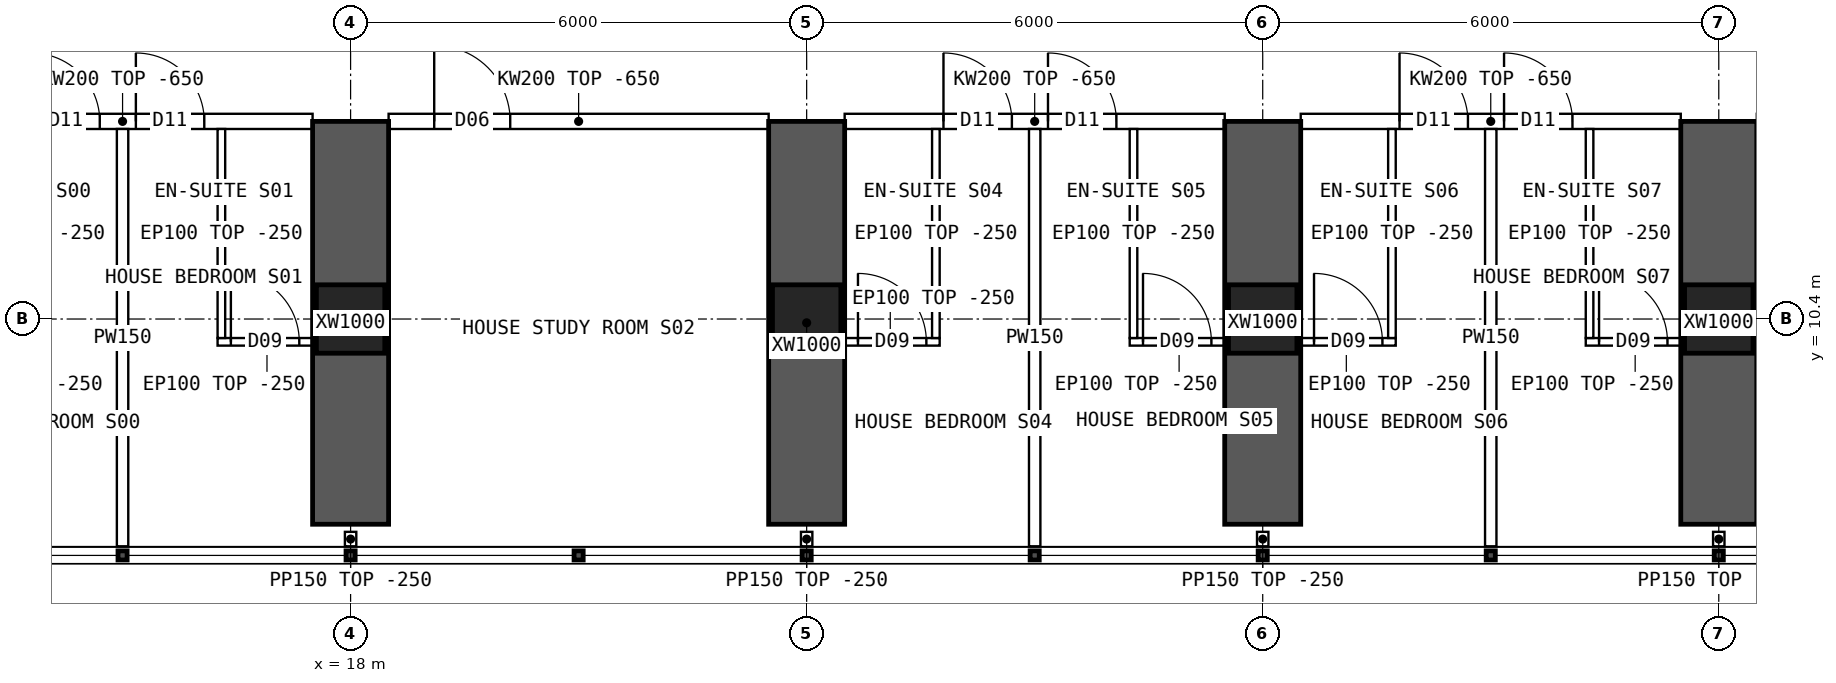
"""IFC4 building model, lengths in metres.
Left out: names, types, materials, properties, quantities, classifications, styles, units other than length and angle.
Written with IfcOpenShell. Run it as: python <this file> out.ifc"""

import sys

from ifc_helpers import new_model, si_unit, direction, frame, frame_2d, origin, origin_2d, place, context, subcontext, project, spatial, polyline, rectangle, hollow_rectangle, outline, extrude, element, fill, save


model = new_model("IFC4")
c1 = context("Model", 3, precision=1e-05, world=origin(), true_north=direction((0.0, 1.0)))
c2 = subcontext(c1, "Body", "Model", "MODEL_VIEW")
j1 = project(units=[si_unit("LENGTHUNIT", "METRE"), si_unit("PLANEANGLEUNIT", "RADIAN")], contexts=[c1])
p1 = place(None, origin())
s1 = spatial("IfcSite", under=j1, at=p1, CompositionType="ELEMENT")
p2 = place(p1, origin())
s2 = spatial("IfcBuilding", under=s1, at=p2, CompositionType="ELEMENT")
p3 = place(p2, frame((0.0, 0.0, 42.7)))
s3 = spatial("IfcBuildingStorey", under=s2, at=p3, CompositionType="ELEMENT", Elevation=42.7)
for number, where, z_axis, x_axis in (
    (1, (18.0, 10.4, 0.0), (0.0, 0.0, 1.0), (1.0, 0.0, 0.0)),
    (2, (24.0, 10.4, 0.0), (0.0, 0.0, 1.0), (1.0, 0.0, 0.0)),
    (3, (30.0, 10.4, 0.0), (0.0, 0.0, 1.0), (1.0, 0.0, 0.0)),
    (4, (36.0, 10.4, 0.0), (0.0, 0.0, 1.0), (1.0, 0.0, 0.0)),
):
    element("IfcColumn", number, at=place(p3, frame(where, z_axis=z_axis, x_axis=x_axis)), inside=s3, PredefinedType="COLUMN", context=c2, shape_type="SweptSolid", body=[
        extrude(hollow_rectangle(XDim=0.9, YDim=0.9, WallThickness=0.09, at=origin_2d()), origin(), (0.0, 0.0, 1.0), 3.75),
    ])
for number, where, z_axis, x_axis in (
    (5, (18.0, 7.7, 0.0), (0.0, 0.0, 1.0), (0.0, 1.0, 0.0)),
    (6, (24.0, 7.7, 0.0), (0.0, 0.0, 1.0), (0.0, 1.0, 0.0)),
    (7, (30.0, 7.7, 0.0), (0.0, 0.0, 1.0), (0.0, 1.0, 0.0)),
    (8, (36.0, 7.7, 0.0), (0.0, 0.0, 1.0), (0.0, 1.0, 0.0)),
):
    element("IfcWall", number, at=place(p3, frame(where, z_axis=z_axis, x_axis=x_axis)), inside=s3, PredefinedType="SHEAR", context=c2, shape_type="SweptSolid", body=[
        extrude(rectangle(XDim=5.3, YDim=1.0, at=frame_2d((2.65, 0.0))), origin(), (0.0, 0.0, 1.0), 3.75),
    ])
p4 = place(p3, frame((12.5, 13.0, 0.0), z_axis=(0.0, 0.0, 1.0), x_axis=(1.0, 0.0, 0.0)))
e9 = element("IfcWall", 9, at=p4, inside=s3, PredefinedType="SOLIDWALL", context=c2, shape_type="SweptSolid", body=[
    extrude(outline(polyline([(0.0, 0.0), (5.0, 0.0), (5.0, 3.1), (0.0, 3.1), (0.0, 0.0)])), frame((0.0, 0.1, 0.0), z_axis=(0.0, -1.0, 0.0), x_axis=(1.0, 0.0, 0.0)), (0.0, 0.0, 1.0), 0.2),
])
p5 = place(p4, frame((1.3, 0.0, 0.0)))
e10 = element("IfcOpeningElement", 10, at=p5, cuts=e9, PredefinedType="OPENING", context=c2, shape_type="SweptSolid", body=[
    extrude(rectangle(XDim=0.9, YDim=2.1, at=frame_2d((0.45, 1.05))), frame((0.0, 0.11, 0.0), z_axis=(0.0, -1.0, 0.0), x_axis=(1.0, 0.0, 0.0)), (0.0, 0.0, 1.0), 0.22),
])
p6 = place(p4, frame((2.675, 0.0, 0.0)))
e11 = element("IfcOpeningElement", 11, at=p6, cuts=e9, PredefinedType="OPENING", context=c2, shape_type="SweptSolid", body=[
    extrude(rectangle(XDim=0.9, YDim=2.1, at=frame_2d((0.45, 1.05))), frame((0.0, 0.11, 0.0), z_axis=(0.0, -1.0, 0.0), x_axis=(1.0, 0.0, 0.0)), (0.0, 0.0, 1.0), 0.22),
])
p7 = place(p3, frame((18.5, 13.0, 0.0), z_axis=(0.0, 0.0, 1.0), x_axis=(1.0, 0.0, 0.0)))
e12 = element("IfcWall", 12, at=p7, inside=s3, PredefinedType="SOLIDWALL", context=c2, shape_type="SweptSolid", body=[
    extrude(outline(polyline([(0.0, 0.0), (5.0, 0.0), (5.0, 3.1), (0.0, 3.1), (0.0, 0.0)])), frame((0.0, 0.1, 0.0), z_axis=(0.0, -1.0, 0.0), x_axis=(1.0, 0.0, 0.0)), (0.0, 0.0, 1.0), 0.2),
])
p8 = place(p7, frame((0.6, 0.0, 0.0)))
e13 = element("IfcOpeningElement", 13, at=p8, cuts=e12, PredefinedType="OPENING", context=c2, shape_type="SweptSolid", body=[
    extrude(rectangle(XDim=1.0, YDim=2.1, at=frame_2d((0.5, 1.05))), frame((0.0, 0.11, 0.0), z_axis=(0.0, -1.0, 0.0), x_axis=(1.0, 0.0, 0.0)), (0.0, 0.0, 1.0), 0.22),
])
p9 = place(p3, frame((24.5, 13.0, 0.0), z_axis=(0.0, 0.0, 1.0), x_axis=(1.0, 0.0, 0.0)))
e14 = element("IfcWall", 14, at=p9, inside=s3, PredefinedType="SOLIDWALL", context=c2, shape_type="SweptSolid", body=[
    extrude(outline(polyline([(0.0, 0.0), (5.0, 0.0), (5.0, 3.1), (0.0, 3.1), (0.0, 0.0)])), frame((0.0, 0.1, 0.0), z_axis=(0.0, -1.0, 0.0), x_axis=(1.0, 0.0, 0.0)), (0.0, 0.0, 1.0), 0.2),
])
p10 = place(p9, frame((1.3, 0.0, 0.0)))
e15 = element("IfcOpeningElement", 15, at=p10, cuts=e14, PredefinedType="OPENING", context=c2, shape_type="SweptSolid", body=[
    extrude(rectangle(XDim=0.9, YDim=2.1, at=frame_2d((0.45, 1.05))), frame((0.0, 0.11, 0.0), z_axis=(0.0, -1.0, 0.0), x_axis=(1.0, 0.0, 0.0)), (0.0, 0.0, 1.0), 0.22),
])
p11 = place(p9, frame((2.675, 0.0, 0.0)))
e16 = element("IfcOpeningElement", 16, at=p11, cuts=e14, PredefinedType="OPENING", context=c2, shape_type="SweptSolid", body=[
    extrude(rectangle(XDim=0.9, YDim=2.1, at=frame_2d((0.45, 1.05))), frame((0.0, 0.11, 0.0), z_axis=(0.0, -1.0, 0.0), x_axis=(1.0, 0.0, 0.0)), (0.0, 0.0, 1.0), 0.22),
])
p12 = place(p3, frame((30.5, 13.0, 0.0), z_axis=(0.0, 0.0, 1.0), x_axis=(1.0, 0.0, 0.0)))
e17 = element("IfcWall", 17, at=p12, inside=s3, PredefinedType="SOLIDWALL", context=c2, shape_type="SweptSolid", body=[
    extrude(outline(polyline([(0.0, 0.0), (5.0, 0.0), (5.0, 3.1), (0.0, 3.1), (0.0, 0.0)])), frame((0.0, 0.1, 0.0), z_axis=(0.0, -1.0, 0.0), x_axis=(1.0, 0.0, 0.0)), (0.0, 0.0, 1.0), 0.2),
])
p13 = place(p12, frame((1.3, 0.0, 0.0)))
e18 = element("IfcOpeningElement", 18, at=p13, cuts=e17, PredefinedType="OPENING", context=c2, shape_type="SweptSolid", body=[
    extrude(rectangle(XDim=0.9, YDim=2.1, at=frame_2d((0.45, 1.05))), frame((0.0, 0.11, 0.0), z_axis=(0.0, -1.0, 0.0), x_axis=(1.0, 0.0, 0.0)), (0.0, 0.0, 1.0), 0.22),
])
p14 = place(p12, frame((2.675, 0.0, 0.0)))
e19 = element("IfcOpeningElement", 19, at=p14, cuts=e17, PredefinedType="OPENING", context=c2, shape_type="SweptSolid", body=[
    extrude(rectangle(XDim=0.9, YDim=2.1, at=frame_2d((0.45, 1.05))), frame((0.0, 0.11, 0.0), z_axis=(0.0, -1.0, 0.0), x_axis=(1.0, 0.0, 0.0)), (0.0, 0.0, 1.0), 0.22),
])
p15 = place(p3, frame((15.0, 7.41, 0.0), z_axis=(0.0, 0.0, 1.0), x_axis=(0.0, 1.0, 0.0)))
e20 = element("IfcWall", 20, at=p15, inside=s3, PredefinedType="PARTITIONING", context=c2, shape_type="SweptSolid", body=[
    extrude(outline(polyline([(0.0, 0.0), (5.49, 0.0), (5.49, 3.1), (5.442, 3.1), (5.44, 3.5), (3.192, 3.5), (3.19, 3.1), (2.792, 3.1), (2.79, 3.5), (0.0, 3.5), (0.0, 0.0)])), frame((0.0, 0.075, 0.0), z_axis=(0.0, -1.0, 0.0), x_axis=(1.0, 0.0, 0.0)), (0.0, 0.0, 1.0), 0.15),
])
p16 = place(p3, frame((17.55, 10.1, 0.0), z_axis=(0.0, 0.0, 1.0), x_axis=(-1.0, 0.0, 0.0)))
e21 = element("IfcWall", 21, at=p16, inside=s3, PredefinedType="PARTITIONING", context=c2, shape_type="SweptSolid", body=[
    extrude(rectangle(XDim=1.3, YDim=0.1, at=frame_2d((0.65, 0.0))), origin(), (0.0, 0.0, 1.0), 3.5),
])
p17 = place(p16, frame((0.225, 0.0, 0.0)))
e22 = element("IfcOpeningElement", 22, at=p17, cuts=e21, PredefinedType="OPENING", context=c2, shape_type="SweptSolid", body=[
    extrude(rectangle(XDim=0.9, YDim=2.1, at=frame_2d((0.45, 1.05))), frame((0.0, 0.06, 0.0), z_axis=(0.0, -1.0, 0.0), x_axis=(1.0, 0.0, 0.0)), (0.0, 0.0, 1.0), 0.12),
])
p18 = place(p3, frame((16.3, 10.15, 0.0), z_axis=(0.0, 0.0, 1.0), x_axis=(0.0, 1.0, 0.0)))
e23 = element("IfcWall", 23, at=p18, inside=s3, PredefinedType="PARTITIONING", context=c2, shape_type="SweptSolid", body=[
    extrude(outline(polyline([(0.0, 0.0), (2.75, 0.0), (2.75, 3.1), (2.702, 3.1), (2.7, 3.5), (0.452, 3.5), (0.45, 3.1), (0.052, 3.1), (0.05, 3.5), (0.0, 3.5), (0.0, 0.0)])), frame((0.0, 0.05, 0.0), z_axis=(0.0, -1.0, 0.0), x_axis=(1.0, 0.0, 0.0)), (0.0, 0.0, 1.0), 0.1),
])
p19 = place(p3, frame((27.0, 7.41, 0.0), z_axis=(0.0, 0.0, 1.0), x_axis=(0.0, 1.0, 0.0)))
e24 = element("IfcWall", 24, at=p19, inside=s3, PredefinedType="PARTITIONING", context=c2, shape_type="SweptSolid", body=[
    extrude(outline(polyline([(0.0, 0.0), (5.49, 0.0), (5.49, 3.1), (5.442, 3.1), (5.44, 3.5), (3.192, 3.5), (3.19, 3.1), (2.792, 3.1), (2.79, 3.5), (0.0, 3.5), (0.0, 0.0)])), frame((0.0, 0.075, 0.0), z_axis=(0.0, -1.0, 0.0), x_axis=(1.0, 0.0, 0.0)), (0.0, 0.0, 1.0), 0.15),
])
p20 = place(p3, frame((25.75, 10.1, 0.0), z_axis=(0.0, 0.0, 1.0), x_axis=(-1.0, 0.0, 0.0)))
e25 = element("IfcWall", 25, at=p20, inside=s3, PredefinedType="PARTITIONING", context=c2, shape_type="SweptSolid", body=[
    extrude(rectangle(XDim=1.3, YDim=0.1, at=frame_2d((0.65, 0.0))), origin(), (0.0, 0.0, 1.0), 3.5),
])
p21 = place(p20, frame((0.175, 0.0, 0.0)))
e26 = element("IfcOpeningElement", 26, at=p21, cuts=e25, PredefinedType="OPENING", context=c2, shape_type="SweptSolid", body=[
    extrude(rectangle(XDim=0.9, YDim=2.1, at=frame_2d((0.45, 1.05))), frame((0.0, 0.06, 0.0), z_axis=(0.0, -1.0, 0.0), x_axis=(1.0, 0.0, 0.0)), (0.0, 0.0, 1.0), 0.12),
])
p22 = place(p3, frame((25.7, 10.15, 0.0), z_axis=(0.0, 0.0, 1.0), x_axis=(0.0, 1.0, 0.0)))
e27 = element("IfcWall", 27, at=p22, inside=s3, PredefinedType="PARTITIONING", context=c2, shape_type="SweptSolid", body=[
    extrude(outline(polyline([(0.0, 0.0), (2.75, 0.0), (2.75, 3.1), (2.702, 3.1), (2.7, 3.5), (0.452, 3.5), (0.45, 3.1), (0.052, 3.1), (0.05, 3.5), (0.0, 3.5), (0.0, 0.0)])), frame((0.0, 0.05, 0.0), z_axis=(0.0, -1.0, 0.0), x_axis=(1.0, 0.0, 0.0)), (0.0, 0.0, 1.0), 0.1),
])
p23 = place(p3, frame((29.55, 10.1, 0.0), z_axis=(0.0, 0.0, 1.0), x_axis=(-1.0, 0.0, 0.0)))
e28 = element("IfcWall", 28, at=p23, inside=s3, PredefinedType="PARTITIONING", context=c2, shape_type="SweptSolid", body=[
    extrude(rectangle(XDim=1.3, YDim=0.1, at=frame_2d((0.65, 0.0))), origin(), (0.0, 0.0, 1.0), 3.5),
])
p24 = place(p23, frame((0.225, 0.0, 0.0)))
e29 = element("IfcOpeningElement", 29, at=p24, cuts=e28, PredefinedType="OPENING", context=c2, shape_type="SweptSolid", body=[
    extrude(rectangle(XDim=0.9, YDim=2.1, at=frame_2d((0.45, 1.05))), frame((0.0, 0.06, 0.0), z_axis=(0.0, -1.0, 0.0), x_axis=(1.0, 0.0, 0.0)), (0.0, 0.0, 1.0), 0.12),
])
p25 = place(p3, frame((28.3, 10.15, 0.0), z_axis=(0.0, 0.0, 1.0), x_axis=(0.0, 1.0, 0.0)))
e30 = element("IfcWall", 30, at=p25, inside=s3, PredefinedType="PARTITIONING", context=c2, shape_type="SweptSolid", body=[
    extrude(outline(polyline([(0.0, 0.0), (2.75, 0.0), (2.75, 3.1), (2.702, 3.1), (2.7, 3.5), (0.452, 3.5), (0.45, 3.1), (0.052, 3.1), (0.05, 3.5), (0.0, 3.5), (0.0, 0.0)])), frame((0.0, 0.05, 0.0), z_axis=(0.0, -1.0, 0.0), x_axis=(1.0, 0.0, 0.0)), (0.0, 0.0, 1.0), 0.1),
])
p26 = place(p3, frame((33.0, 7.41, 0.0), z_axis=(0.0, 0.0, 1.0), x_axis=(0.0, 1.0, 0.0)))
e31 = element("IfcWall", 31, at=p26, inside=s3, PredefinedType="PARTITIONING", context=c2, shape_type="SweptSolid", body=[
    extrude(outline(polyline([(0.0, 0.0), (5.49, 0.0), (5.49, 3.1), (5.442, 3.1), (5.44, 3.5), (3.192, 3.5), (3.19, 3.1), (2.792, 3.1), (2.79, 3.5), (0.0, 3.5), (0.0, 0.0)])), frame((0.0, 0.075, 0.0), z_axis=(0.0, -1.0, 0.0), x_axis=(1.0, 0.0, 0.0)), (0.0, 0.0, 1.0), 0.15),
])
p27 = place(p3, frame((31.75, 10.1, 0.0), z_axis=(0.0, 0.0, 1.0), x_axis=(-1.0, 0.0, 0.0)))
e32 = element("IfcWall", 32, at=p27, inside=s3, PredefinedType="PARTITIONING", context=c2, shape_type="SweptSolid", body=[
    extrude(rectangle(XDim=1.3, YDim=0.1, at=frame_2d((0.65, 0.0))), origin(), (0.0, 0.0, 1.0), 3.5),
])
p28 = place(p27, frame((0.175, 0.0, 0.0)))
e33 = element("IfcOpeningElement", 33, at=p28, cuts=e32, PredefinedType="OPENING", context=c2, shape_type="SweptSolid", body=[
    extrude(rectangle(XDim=0.9, YDim=2.1, at=frame_2d((0.45, 1.05))), frame((0.0, 0.06, 0.0), z_axis=(0.0, -1.0, 0.0), x_axis=(1.0, 0.0, 0.0)), (0.0, 0.0, 1.0), 0.12),
])
p29 = place(p3, frame((31.7, 10.15, 0.0), z_axis=(0.0, 0.0, 1.0), x_axis=(0.0, 1.0, 0.0)))
e34 = element("IfcWall", 34, at=p29, inside=s3, PredefinedType="PARTITIONING", context=c2, shape_type="SweptSolid", body=[
    extrude(outline(polyline([(0.0, 0.0), (2.75, 0.0), (2.75, 3.1), (2.702, 3.1), (2.7, 3.5), (0.452, 3.5), (0.45, 3.1), (0.052, 3.1), (0.05, 3.5), (0.0, 3.5), (0.0, 0.0)])), frame((0.0, 0.05, 0.0), z_axis=(0.0, -1.0, 0.0), x_axis=(1.0, 0.0, 0.0)), (0.0, 0.0, 1.0), 0.1),
])
p30 = place(p3, frame((35.55, 10.1, 0.0), z_axis=(0.0, 0.0, 1.0), x_axis=(-1.0, 0.0, 0.0)))
e35 = element("IfcWall", 35, at=p30, inside=s3, PredefinedType="PARTITIONING", context=c2, shape_type="SweptSolid", body=[
    extrude(rectangle(XDim=1.3, YDim=0.1, at=frame_2d((0.65, 0.0))), origin(), (0.0, 0.0, 1.0), 3.5),
])
p31 = place(p30, frame((0.225, 0.0, 0.0)))
e36 = element("IfcOpeningElement", 36, at=p31, cuts=e35, PredefinedType="OPENING", context=c2, shape_type="SweptSolid", body=[
    extrude(rectangle(XDim=0.9, YDim=2.1, at=frame_2d((0.45, 1.05))), frame((0.0, 0.06, 0.0), z_axis=(0.0, -1.0, 0.0), x_axis=(1.0, 0.0, 0.0)), (0.0, 0.0, 1.0), 0.12),
])
p32 = place(p3, frame((34.3, 10.15, 0.0), z_axis=(0.0, 0.0, 1.0), x_axis=(0.0, 1.0, 0.0)))
e37 = element("IfcWall", 37, at=p32, inside=s3, PredefinedType="PARTITIONING", context=c2, shape_type="SweptSolid", body=[
    extrude(outline(polyline([(0.0, 0.0), (2.75, 0.0), (2.75, 3.1), (2.702, 3.1), (2.7, 3.5), (0.452, 3.5), (0.45, 3.1), (0.052, 3.1), (0.05, 3.5), (0.0, 3.5), (0.0, 0.0)])), frame((0.0, 0.05, 0.0), z_axis=(0.0, -1.0, 0.0), x_axis=(1.0, 0.0, 0.0)), (0.0, 0.0, 1.0), 0.1),
])
for number, where, z_axis, x_axis in (
    (38, (18.0, 7.6, 0.0), (0.0, 0.0, 1.0), (0.0, -1.0, 0.0)),
    (39, (24.0, 7.6, 0.0), (0.0, 0.0, 1.0), (0.0, -1.0, 0.0)),
    (40, (30.0, 7.6, 0.0), (0.0, 0.0, 1.0), (0.0, -1.0, 0.0)),
    (41, (36.0, 7.6, 0.0), (0.0, 0.0, 1.0), (0.0, -1.0, 0.0)),
):
    element("IfcWall", number, at=place(p3, frame(where, z_axis=z_axis, x_axis=x_axis)), inside=s3, PredefinedType="PARTITIONING", context=c2, shape_type="SweptSolid", body=[
        extrude(rectangle(XDim=0.19, YDim=0.15, at=frame_2d((0.095, 0.0))), origin(), (0.0, 0.0, 1.0), 3.5),
    ])
p33 = place(p5, origin())
e42 = element("IfcDoor", 42, at=p33, inside=s3, OperationType="SINGLE_SWING_LEFT", PredefinedType="DOOR", context=c2, shape_type="SweptSolid", body=[
    extrude(rectangle(XDim=0.9, YDim=2.1, at=frame_2d((0.45, 1.05))), frame((0.0, 0.025, 0.0), z_axis=(0.0, -1.0, 0.0), x_axis=(1.0, 0.0, 0.0)), (0.0, 0.0, 1.0), 0.05),
])
fill(e10, e42)
p34 = place(p17, origin())
e43 = element("IfcDoor", 43, at=p34, inside=s3, OperationType="SINGLE_SWING_RIGHT", PredefinedType="DOOR", context=c2, shape_type="SweptSolid", body=[
    extrude(rectangle(XDim=0.9, YDim=2.1, at=frame_2d((0.45, 1.05))), frame((0.0, 0.025, 0.0), z_axis=(0.0, -1.0, 0.0), x_axis=(1.0, 0.0, 0.0)), (0.0, 0.0, 1.0), 0.05),
])
fill(e22, e43)
p35 = place(p6, origin())
e44 = element("IfcDoor", 44, at=p35, inside=s3, OperationType="SINGLE_SWING_LEFT", PredefinedType="DOOR", context=c2, shape_type="SweptSolid", body=[
    extrude(rectangle(XDim=0.9, YDim=2.1, at=frame_2d((0.45, 1.05))), frame((0.0, 0.025, 0.0), z_axis=(0.0, -1.0, 0.0), x_axis=(1.0, 0.0, 0.0)), (0.0, 0.0, 1.0), 0.05),
])
fill(e11, e44)
p36 = place(p8, origin())
e45 = element("IfcDoor", 45, at=p36, inside=s3, OperationType="SINGLE_SWING_LEFT", PredefinedType="DOOR", context=c2, shape_type="SweptSolid", body=[
    extrude(rectangle(XDim=1.0, YDim=2.1, at=frame_2d((0.5, 1.05))), frame((0.0, 0.025, 0.0), z_axis=(0.0, -1.0, 0.0), x_axis=(1.0, 0.0, 0.0)), (0.0, 0.0, 1.0), 0.05),
])
fill(e13, e45)
p37 = place(p21, origin())
e46 = element("IfcDoor", 46, at=p37, inside=s3, OperationType="SINGLE_SWING_RIGHT", PredefinedType="DOOR", context=c2, shape_type="SweptSolid", body=[
    extrude(rectangle(XDim=0.9, YDim=2.1, at=frame_2d((0.45, 1.05))), frame((0.0, 0.025, 0.0), z_axis=(0.0, -1.0, 0.0), x_axis=(1.0, 0.0, 0.0)), (0.0, 0.0, 1.0), 0.05),
])
fill(e26, e46)
p38 = place(p10, origin())
e47 = element("IfcDoor", 47, at=p38, inside=s3, OperationType="SINGLE_SWING_LEFT", PredefinedType="DOOR", context=c2, shape_type="SweptSolid", body=[
    extrude(rectangle(XDim=0.9, YDim=2.1, at=frame_2d((0.45, 1.05))), frame((0.0, 0.025, 0.0), z_axis=(0.0, -1.0, 0.0), x_axis=(1.0, 0.0, 0.0)), (0.0, 0.0, 1.0), 0.05),
])
fill(e15, e47)
p39 = place(p24, origin())
e48 = element("IfcDoor", 48, at=p39, inside=s3, OperationType="SINGLE_SWING_RIGHT", PredefinedType="DOOR", context=c2, shape_type="SweptSolid", body=[
    extrude(rectangle(XDim=0.9, YDim=2.1, at=frame_2d((0.45, 1.05))), frame((0.0, 0.025, 0.0), z_axis=(0.0, -1.0, 0.0), x_axis=(1.0, 0.0, 0.0)), (0.0, 0.0, 1.0), 0.05),
])
fill(e29, e48)
p40 = place(p11, origin())
e49 = element("IfcDoor", 49, at=p40, inside=s3, OperationType="SINGLE_SWING_LEFT", PredefinedType="DOOR", context=c2, shape_type="SweptSolid", body=[
    extrude(rectangle(XDim=0.9, YDim=2.1, at=frame_2d((0.45, 1.05))), frame((0.0, 0.025, 0.0), z_axis=(0.0, -1.0, 0.0), x_axis=(1.0, 0.0, 0.0)), (0.0, 0.0, 1.0), 0.05),
])
fill(e16, e49)
p41 = place(p28, origin())
e50 = element("IfcDoor", 50, at=p41, inside=s3, OperationType="SINGLE_SWING_RIGHT", PredefinedType="DOOR", context=c2, shape_type="SweptSolid", body=[
    extrude(rectangle(XDim=0.9, YDim=2.1, at=frame_2d((0.45, 1.05))), frame((0.0, 0.025, 0.0), z_axis=(0.0, -1.0, 0.0), x_axis=(1.0, 0.0, 0.0)), (0.0, 0.0, 1.0), 0.05),
])
fill(e33, e50)
p42 = place(p13, origin())
e51 = element("IfcDoor", 51, at=p42, inside=s3, OperationType="SINGLE_SWING_LEFT", PredefinedType="DOOR", context=c2, shape_type="SweptSolid", body=[
    extrude(rectangle(XDim=0.9, YDim=2.1, at=frame_2d((0.45, 1.05))), frame((0.0, 0.025, 0.0), z_axis=(0.0, -1.0, 0.0), x_axis=(1.0, 0.0, 0.0)), (0.0, 0.0, 1.0), 0.05),
])
fill(e18, e51)
p43 = place(p31, origin())
e52 = element("IfcDoor", 52, at=p43, inside=s3, OperationType="SINGLE_SWING_RIGHT", PredefinedType="DOOR", context=c2, shape_type="SweptSolid", body=[
    extrude(rectangle(XDim=0.9, YDim=2.1, at=frame_2d((0.45, 1.05))), frame((0.0, 0.025, 0.0), z_axis=(0.0, -1.0, 0.0), x_axis=(1.0, 0.0, 0.0)), (0.0, 0.0, 1.0), 0.05),
])
fill(e36, e52)
p44 = place(p14, origin())
e53 = element("IfcDoor", 53, at=p44, inside=s3, OperationType="SINGLE_SWING_LEFT", PredefinedType="DOOR", context=c2, shape_type="SweptSolid", body=[
    extrude(rectangle(XDim=0.9, YDim=2.1, at=frame_2d((0.45, 1.05))), frame((0.0, 0.025, 0.0), z_axis=(0.0, -1.0, 0.0), x_axis=(1.0, 0.0, 0.0)), (0.0, 0.0, 1.0), 0.05),
])
fill(e19, e53)
save(model, sys.argv[1])
